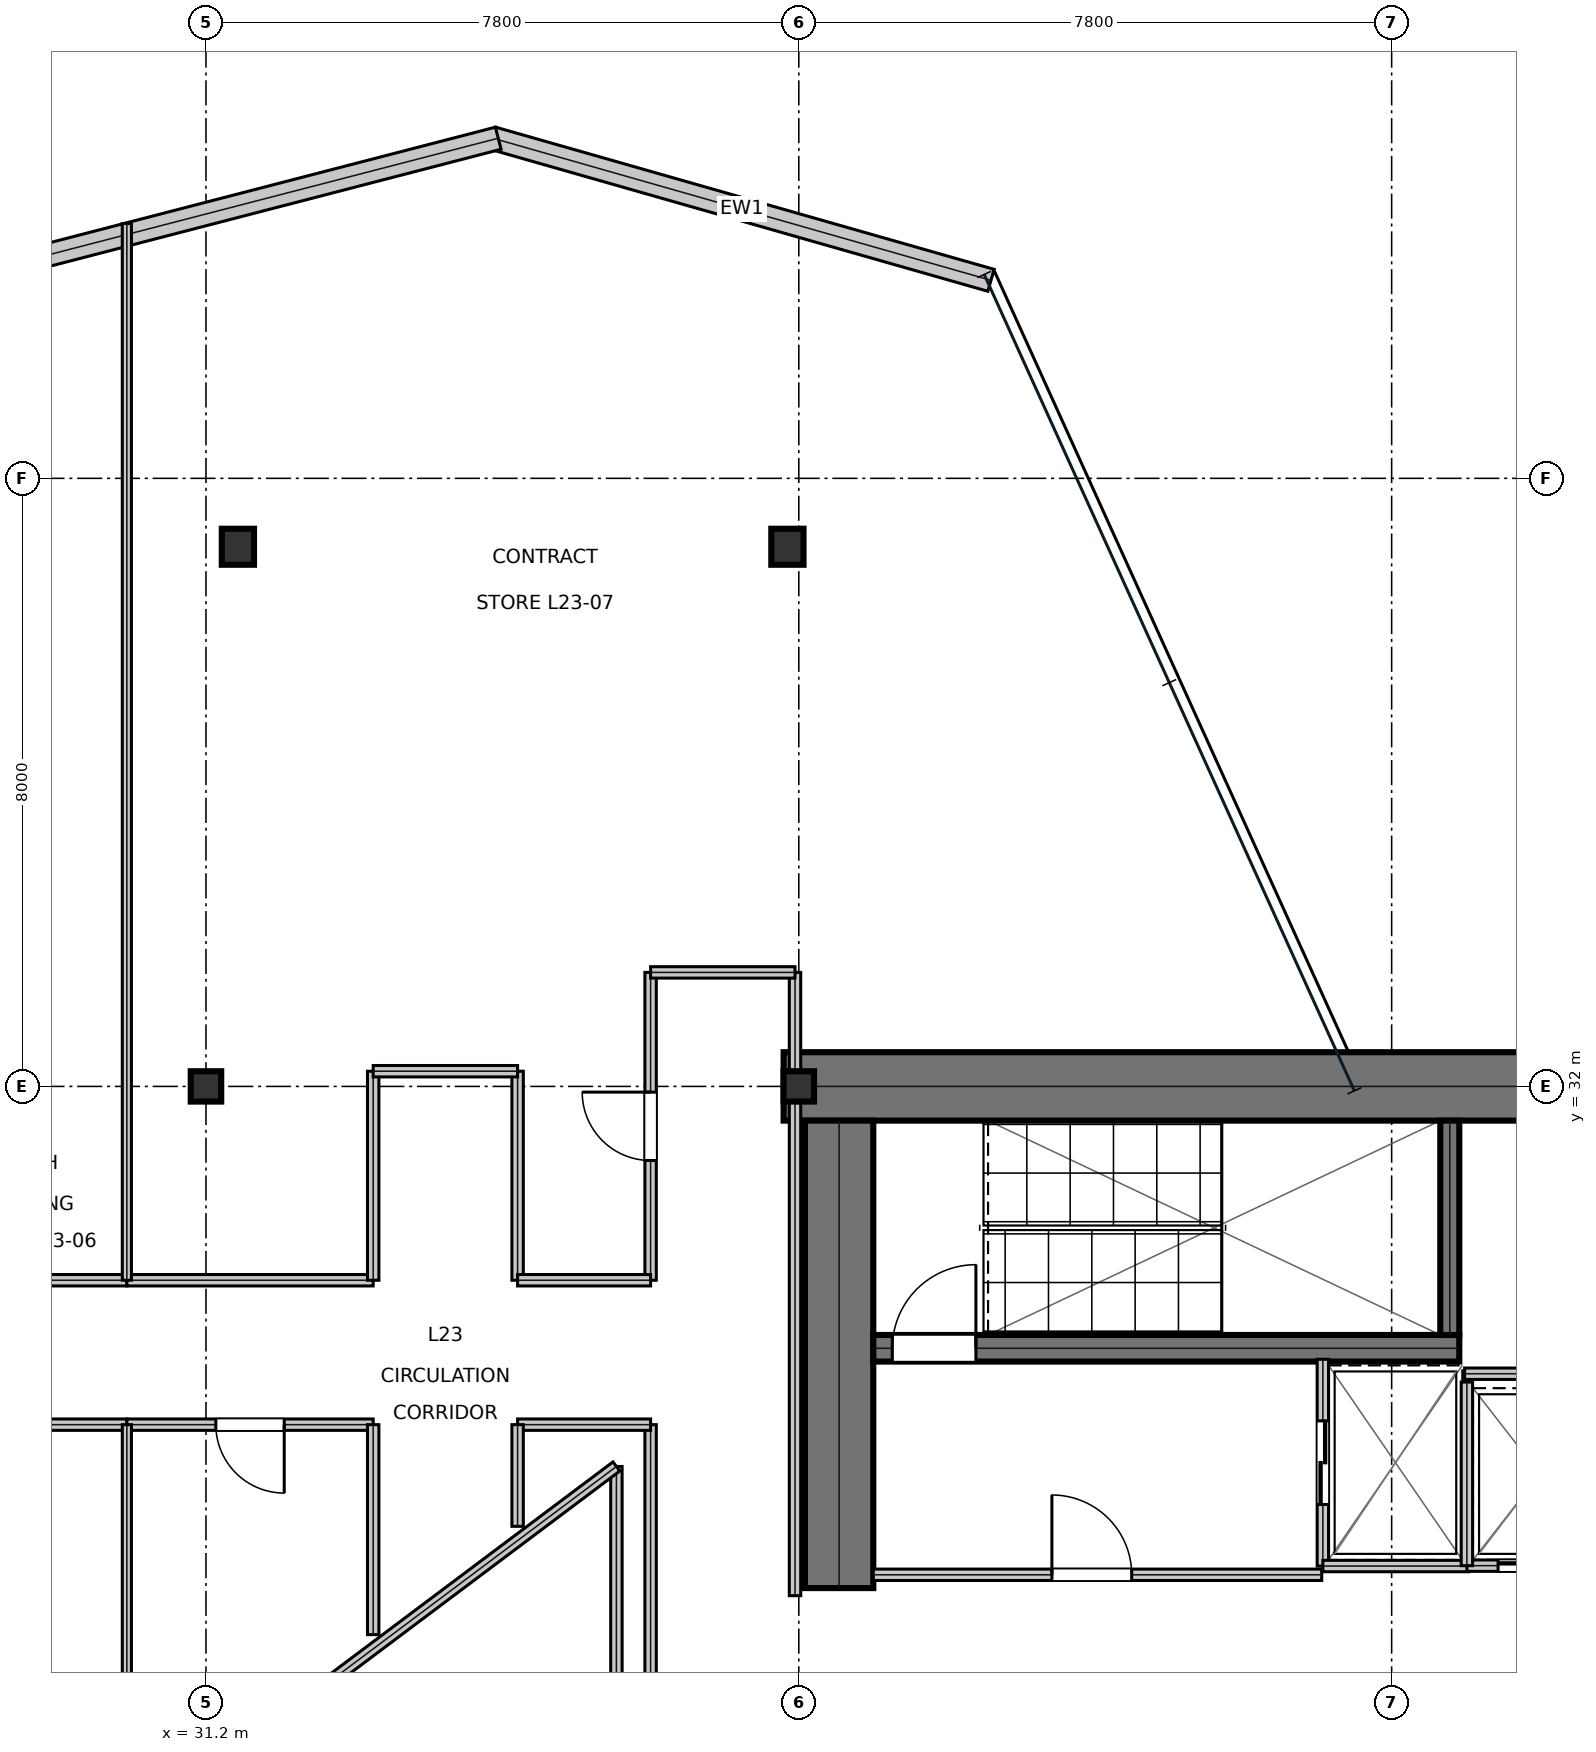
"""IFC4 building model, lengths in metres.
Left out: names, types, materials, properties, quantities, classifications, styles, units other than length and angle.
Written with IfcOpenShell. Run it as: python <this file> out.ifc"""

import sys

from ifc_helpers import new_model, si_unit, direction, frame, frame_2d, origin, origin_2d, place, context, subcontext, project, spatial, rectangle, i_section, extrude, element, fill, save


model = new_model("IFC4")
c1 = context("Model", 3, precision=1e-05, world=origin(), true_north=direction((0.0, 1.0)))
c2 = subcontext(c1, "Body", "Model", "MODEL_VIEW")
j1 = project(units=[si_unit("LENGTHUNIT", "METRE"), si_unit("PLANEANGLEUNIT", "RADIAN")], contexts=[c1])
p1 = place(None, origin())
s1 = spatial("IfcSite", under=j1, at=p1, CompositionType="ELEMENT")
p2 = place(p1, origin())
s2 = spatial("IfcBuilding", under=s1, at=p2, CompositionType="ELEMENT")
p3 = place(p2, frame((0.0, 0.0, 102.6)))
s3 = spatial("IfcBuildingStorey", under=s2, at=p3, CompositionType="ELEMENT", Elevation=102.6)
p4 = place(p3, frame((38.8, 32.0, 0.0), z_axis=(0.0, 0.0, 1.0), x_axis=(1.0, 0.0, 0.0)))
e1 = element("IfcWall", 1, at=p4, inside=s3, PredefinedType="SHEAR", context=c2, shape_type="SweptSolid", body=[
    extrude(rectangle(XDim=16.0, YDim=0.9, at=frame_2d((8.0, 0.0))), origin(), (0.0, 0.0, 1.0), 3.73),
])
p5 = place(p3, frame((39.53, 25.4, 0.0), z_axis=(0.0, 0.0, 1.0), x_axis=(0.0, 1.0, 0.0)))
e2 = element("IfcWall", 2, at=p5, inside=s3, PredefinedType="SHEAR", context=c2, shape_type="SweptSolid", body=[
    extrude(rectangle(XDim=6.15, YDim=0.9, at=frame_2d((3.075, 0.0))), origin(), (0.0, 0.0, 1.0), 3.73),
])
p6 = place(p3, frame((39.98, 28.555, 0.0), z_axis=(0.0, 0.0, 1.0), x_axis=(1.0, 0.0, 0.0)))
e3 = element("IfcWall", 3, at=p6, inside=s3, PredefinedType="SHEAR", context=c2, shape_type="SweptSolid", body=[
    extrude(rectangle(XDim=7.71, YDim=0.35, at=frame_2d((3.855, 0.0))), origin(), (0.0, 0.0, 1.0), 3.73),
])
p7 = place(p6, frame((0.25, 0.0, 0.0)))
e4 = element("IfcOpeningElement", 4, at=p7, cuts=e3, PredefinedType="OPENING", context=c2, shape_type="SweptSolid", body=[
    extrude(rectangle(XDim=1.1, YDim=2.15, at=frame_2d((0.55, 1.075))), frame((0.0, 0.185, 0.0), z_axis=(0.0, -1.0, 0.0), x_axis=(1.0, 0.0, 0.0)), (0.0, 0.0, 1.0), 0.37),
])
p8 = place(p3, frame((47.565, 28.73, 0.0), z_axis=(0.0, 0.0, 1.0), x_axis=(0.0, 1.0, 0.0)))
e5 = element("IfcWall", 5, at=p8, inside=s3, PredefinedType="SHEAR", context=c2, shape_type="SweptSolid", body=[
    extrude(rectangle(XDim=2.82, YDim=0.25, at=frame_2d((1.41, 0.0))), origin(), (0.0, 0.0, 1.0), 3.73),
])
for number, where, z_axis, x_axis in (
    (6, (31.2, 32.0, 0.0), (0.0, 0.0, 1.0), (1.0, 0.0, 0.0)),
    (7, (39.0, 32.0, 0.0), (0.0, 0.0, 1.0), (1.0, 0.0, 0.0)),
):
    element("IfcColumn", number, at=place(p3, frame(where, z_axis=z_axis, x_axis=x_axis)), inside=s3, PredefinedType="COLUMN", context=c2, shape_type="SweptSolid", body=[
        extrude(i_section(OverallWidth=0.401, OverallDepth=0.399, WebThickness=0.025, FlangeThickness=0.04, at=origin_2d()), origin(), (0.0, 0.0, 1.0), 4.044),
    ])
p9 = place(p3, frame((31.62, 39.1, 0.016), z_axis=(0.010447648562, -0.022413850693, 0.999694186207), x_axis=(0.906371306068, 0.422482018004, 0.0)))
e8 = element("IfcColumn", 8, at=p9, inside=s3, PredefinedType="COLUMN", context=c2, shape_type="SweptSolid", body=[
    extrude(i_section(OverallWidth=0.424, OverallDepth=0.474, WebThickness=0.048, FlangeThickness=0.077, at=origin_2d()), origin(), (0.0, 0.0, 1.0), 4.019),
])
p10 = place(p3, frame((38.85, 39.1, 0.016), z_axis=(-0.003766191696, -0.022414915097, 0.999741660321), x_axis=(0.986176372522, -0.165699011101, 0.0)))
e9 = element("IfcColumn", 9, at=p10, inside=s3, PredefinedType="COLUMN", context=c2, shape_type="SweptSolid", body=[
    extrude(i_section(OverallWidth=0.424, OverallDepth=0.474, WebThickness=0.048, FlangeThickness=0.077, at=origin_2d()), origin(), (0.0, 0.0, 1.0), 4.019),
])
p11 = place(p3, frame((41.528, 42.605, 0.0), z_axis=(0.0, 0.0, 1.0), x_axis=(-0.961657606646, 0.274252889831, 0.0)))
e10 = element("IfcWall", 10, at=p11, inside=s3, PredefinedType="STANDARD", context=c2, shape_type="SweptSolid", body=[
    extrude(rectangle(XDim=6.818, YDim=0.3, at=frame_2d((3.409, 0.0))), origin(), (0.0, 0.0, 1.0), 3.73),
])
p12 = place(p3, frame((35.045, 44.475, 0.0), z_axis=(0.0, 0.0, 1.0), x_axis=(-0.967987493138, -0.250998432521, 0.0)))
e11 = element("IfcWall", 11, at=p12, inside=s3, PredefinedType="STANDARD", context=c2, shape_type="SweptSolid", body=[
    extrude(rectangle(XDim=6.774, YDim=0.3, at=frame_2d((3.387, 0.0))), origin(), (0.0, 0.0, 1.0), 3.73),
])
p13 = place(p3, frame((39.98, 25.575, 0.0), z_axis=(0.0, 0.0, 1.0), x_axis=(1.0, 0.0, 0.0)))
e12 = element("IfcWall", 12, at=p13, inside=s3, PredefinedType="PARTITIONING", context=c2, shape_type="SweptSolid", body=[
    extrude(rectangle(XDim=5.9, YDim=0.15, at=frame_2d((2.95, 0.0))), origin(), (0.0, 0.0, 1.0), 3.73),
])
p14 = place(p13, frame((2.35, 0.0, 0.0)))
e13 = element("IfcOpeningElement", 13, at=p14, cuts=e12, PredefinedType="OPENING", context=c2, shape_type="SweptSolid", body=[
    extrude(rectangle(XDim=1.05, YDim=2.15, at=frame_2d((0.525, 1.075))), frame((0.0, 0.085, 0.0), z_axis=(0.0, -1.0, 0.0), x_axis=(1.0, 0.0, 0.0)), (0.0, 0.0, 1.0), 0.17),
])
p15 = place(p3, frame((45.895, 25.69, 0.0), z_axis=(0.0, 0.0, 1.0), x_axis=(0.0, 1.0, 0.0)))
e14 = element("IfcWall", 14, at=p15, inside=s3, PredefinedType="PARTITIONING", context=c2, shape_type="SweptSolid", body=[
    extrude(rectangle(XDim=2.72, YDim=0.15, at=frame_2d((1.36, 0.0))), origin(), (0.0, 0.0, 1.0), 3.73),
])
p16 = place(p15, frame((0.81, 0.0, 0.0)))
e15 = element("IfcOpeningElement", 15, at=p16, cuts=e14, PredefinedType="OPENING", context=c2, shape_type="SweptSolid", body=[
    extrude(rectangle(XDim=1.1, YDim=2.15, at=frame_2d((0.55, 1.075))), frame((0.0, 0.085, 0.0), z_axis=(0.0, -1.0, 0.0), x_axis=(1.0, 0.0, 0.0)), (0.0, 0.0, 1.0), 0.17),
])
p17 = place(p3, frame((45.895, 25.69, 0.0), z_axis=(0.0, 0.0, 1.0), x_axis=(1.0, 0.0, 0.0)))
e16 = element("IfcWall", 16, at=p17, inside=s3, PredefinedType="PARTITIONING", context=c2, shape_type="SweptSolid", body=[
    extrude(rectangle(XDim=1.915, YDim=0.15, at=frame_2d((0.958, 0.0))), origin(), (0.0, 0.0, 1.0), 3.73),
])
p18 = place(p3, frame((47.79, 25.695, 0.0), z_axis=(0.0, 0.0, 1.0), x_axis=(1.0, 0.0, 0.0)))
e17 = element("IfcWall", 17, at=p18, inside=s3, PredefinedType="PARTITIONING", context=c2, shape_type="SweptSolid", body=[
    extrude(rectangle(XDim=1.92, YDim=0.15, at=frame_2d((0.96, 0.0))), origin(), (0.0, 0.0, 1.0), 3.73),
])
p19 = place(p18, frame((0.41, 0.0, 0.0)))
e18 = element("IfcOpeningElement", 18, at=p19, cuts=e17, PredefinedType="OPENING", context=c2, shape_type="SweptSolid", body=[
    extrude(rectangle(XDim=1.1, YDim=2.15, at=frame_2d((0.55, 1.075))), frame((0.0, 0.085, 0.0), z_axis=(0.0, -1.0, 0.0), x_axis=(1.0, 0.0, 0.0)), (0.0, 0.0, 1.0), 0.17),
])
p20 = place(p3, frame((47.79, 25.695, 0.0), z_axis=(0.0, 0.0, 1.0), x_axis=(0.0, 1.0, 0.0)))
e19 = element("IfcWall", 19, at=p20, inside=s3, PredefinedType="PARTITIONING", context=c2, shape_type="SweptSolid", body=[
    extrude(rectangle(XDim=2.415, YDim=0.15, at=frame_2d((1.208, 0.0))), origin(), (0.0, 0.0, 1.0), 3.73),
])
p21 = place(p3, frame((47.76, 28.22, 0.0), z_axis=(0.0, 0.0, 1.0), x_axis=(1.0, 0.0, 0.0)))
e20 = element("IfcWall", 20, at=p21, inside=s3, PredefinedType="PARTITIONING", context=c2, shape_type="SweptSolid", body=[
    extrude(rectangle(XDim=1.96, YDim=0.15, at=frame_2d((0.98, 0.0))), origin(), (0.0, 0.0, 1.0), 3.73),
])
p22 = place(p3, frame((37.05, 14.5, 0.0), z_axis=(0.0, 0.0, 1.0), x_axis=(0.0, 1.0, 0.0)))
e21 = element("IfcWall", 21, at=p22, inside=s3, PredefinedType="PARTITIONING", context=c2, shape_type="SweptSolid", body=[
    extrude(rectangle(XDim=13.05, YDim=0.15, at=frame_2d((6.525, 0.0))), origin(), (0.0, 0.0, 1.0), 3.101),
])
p23 = place(p22, frame((4.635, 0.0, 0.0)))
e22 = element("IfcOpeningElement", 22, at=p23, cuts=e21, PredefinedType="OPENING", context=c2, shape_type="SweptSolid", body=[
    extrude(rectangle(XDim=0.9, YDim=2.15, at=frame_2d((0.45, 1.075))), frame((0.0, 0.085, 0.0), z_axis=(0.0, -1.0, 0.0), x_axis=(1.0, 0.0, 0.0)), (0.0, 0.0, 1.0), 0.17),
])
p24 = place(p3, frame((21.4, 27.55, 0.0), z_axis=(0.0, 0.0, 1.0), x_axis=(1.0, 0.0, 0.0)))
e23 = element("IfcWall", 23, at=p24, inside=s3, PredefinedType="PARTITIONING", context=c2, shape_type="SweptSolid", body=[
    extrude(rectangle(XDim=8.759, YDim=0.15, at=frame_2d((4.379, 0.0))), origin(), (0.0, 0.0, 1.0), 3.311),
])
p25 = place(p24, frame((3.929, 0.0, 0.0)))
e24 = element("IfcOpeningElement", 24, at=p25, cuts=e23, PredefinedType="OPENING", context=c2, shape_type="SweptSolid", body=[
    extrude(rectangle(XDim=0.9, YDim=2.15, at=frame_2d((0.45, 1.075))), frame((0.0, 0.085, 0.0), z_axis=(0.0, -1.0, 0.0), x_axis=(1.0, 0.0, 0.0)), (0.0, 0.0, 1.0), 0.17),
])
p26 = place(p3, frame((30.159, 27.55, 0.0), z_axis=(0.0, 0.0, 1.0), x_axis=(1.0, 0.0, 0.0)))
e25 = element("IfcWall", 25, at=p26, inside=s3, PredefinedType="PARTITIONING", context=c2, shape_type="SweptSolid", body=[
    extrude(rectangle(XDim=3.241, YDim=0.15, at=frame_2d((1.621, 0.0))), origin(), (0.0, 0.0, 1.0), 3.101),
])
p27 = place(p26, frame((1.17, 0.0, 0.0)))
e26 = element("IfcOpeningElement", 26, at=p27, cuts=e25, PredefinedType="OPENING", context=c2, shape_type="SweptSolid", body=[
    extrude(rectangle(XDim=0.9, YDim=2.15, at=frame_2d((0.45, 1.075))), frame((0.0, 0.085, 0.0), z_axis=(0.0, -1.0, 0.0), x_axis=(1.0, 0.0, 0.0)), (0.0, 0.0, 1.0), 0.17),
])
p28 = place(p3, frame((19.5, 29.45, 0.0), z_axis=(0.0, 0.0, 1.0), x_axis=(1.0, 0.0, 0.0)))
e27 = element("IfcWall", 27, at=p28, inside=s3, PredefinedType="PARTITIONING", context=c2, shape_type="SweptSolid", body=[
    extrude(rectangle(XDim=10.659, YDim=0.15, at=frame_2d((5.33, 0.0))), origin(), (0.0, 0.0, 1.0), 3.258),
])
p29 = place(p28, frame((7.399, 0.0, 0.0)))
e28 = element("IfcOpeningElement", 28, at=p29, cuts=e27, PredefinedType="OPENING", context=c2, shape_type="SweptSolid", body=[
    extrude(rectangle(XDim=0.9, YDim=2.15, at=frame_2d((0.45, 1.075))), frame((0.0, 0.085, 0.0), z_axis=(0.0, -1.0, 0.0), x_axis=(1.0, 0.0, 0.0)), (0.0, 0.0, 1.0), 0.17),
])
p30 = place(p3, frame((37.05, 29.45, 0.0), z_axis=(0.0, 0.0, 1.0), x_axis=(0.0, 1.0, 0.0)))
e29 = element("IfcWall", 29, at=p30, inside=s3, PredefinedType="PARTITIONING", context=c2, shape_type="SweptSolid", body=[
    extrude(rectangle(XDim=4.05, YDim=0.15, at=frame_2d((2.025, 0.0))), origin(), (0.0, 0.0, 1.0), 3.101),
])
p31 = place(p30, frame((1.575, 0.0, 0.0)))
e30 = element("IfcOpeningElement", 30, at=p31, cuts=e29, PredefinedType="OPENING", context=c2, shape_type="SweptSolid", body=[
    extrude(rectangle(XDim=0.9, YDim=2.15, at=frame_2d((0.45, 1.075))), frame((0.0, 0.085, 0.0), z_axis=(0.0, -1.0, 0.0), x_axis=(1.0, 0.0, 0.0)), (0.0, 0.0, 1.0), 0.17),
])
p32 = place(p3, frame((35.3, 27.55, 0.0), z_axis=(0.0, 0.0, 1.0), x_axis=(1.0, 0.0, 0.0)))
e31 = element("IfcWall", 31, at=p32, inside=s3, PredefinedType="PARTITIONING", context=c2, shape_type="SweptSolid", body=[
    extrude(rectangle(XDim=1.75, YDim=0.15, at=frame_2d((0.875, 0.0))), origin(), (0.0, 0.0, 1.0), 3.311),
])
p33 = place(p3, frame((35.3, 26.212, 0.0), z_axis=(0.0, 0.0, 1.0), x_axis=(0.0, 1.0, 0.0)))
e32 = element("IfcWall", 32, at=p33, inside=s3, PredefinedType="PARTITIONING", context=c2, shape_type="SweptSolid", body=[
    extrude(rectangle(XDim=1.338, YDim=0.15, at=frame_2d((0.669, 0.0))), origin(), (0.0, 0.0, 1.0), 3.73),
])
p34 = place(p3, frame((33.4, 24.788, 0.0), z_axis=(0.0, 0.0, 1.0), x_axis=(0.0, 1.0, 0.0)))
e33 = element("IfcWall", 33, at=p34, inside=s3, PredefinedType="PARTITIONING", context=c2, shape_type="SweptSolid", body=[
    extrude(rectangle(XDim=2.762, YDim=0.15, at=frame_2d((1.381, 0.0))), origin(), (0.0, 0.0, 1.0), 3.73),
])
p35 = place(p3, frame((38.95, 25.3, 0.0), z_axis=(0.0, 0.0, 1.0), x_axis=(0.0, 1.0, 0.0)))
e34 = element("IfcWall", 34, at=p35, inside=s3, PredefinedType="PARTITIONING", context=c2, shape_type="SweptSolid", body=[
    extrude(rectangle(XDim=8.2, YDim=0.15, at=frame_2d((4.1, 0.0))), origin(), (0.0, 0.0, 1.0), 3.101),
])
p36 = place(p3, frame((30.159, 29.45, 0.0), z_axis=(0.0, 0.0, 1.0), x_axis=(1.0, 0.0, 0.0)))
e35 = element("IfcWall", 35, at=p36, inside=s3, PredefinedType="PARTITIONING", context=c2, shape_type="SweptSolid", body=[
    extrude(rectangle(XDim=3.241, YDim=0.15, at=frame_2d((1.621, 0.0))), origin(), (0.0, 0.0, 1.0), 3.101),
])
for number, where, z_axis, x_axis in (
    (36, (33.4, 29.45, 0.0), (0.0, 0.0, 1.0), (0.0, 1.0, 0.0)),
    (37, (35.3, 29.45, 0.0), (0.0, 0.0, 1.0), (0.0, 1.0, 0.0)),
):
    element("IfcWall", number, at=place(p3, frame(where, z_axis=z_axis, x_axis=x_axis)), inside=s3, PredefinedType="PARTITIONING", context=c2, shape_type="SweptSolid", body=[
        extrude(rectangle(XDim=2.75, YDim=0.15, at=frame_2d((1.375, 0.0))), origin(), (0.0, 0.0, 1.0), 3.101),
    ])
p37 = place(p3, frame((37.05, 33.5, 0.0), z_axis=(0.0, 0.0, 1.0), x_axis=(1.0, 0.0, 0.0)))
e38 = element("IfcWall", 38, at=p37, inside=s3, PredefinedType="PARTITIONING", context=c2, shape_type="SweptSolid", body=[
    extrude(rectangle(XDim=1.9, YDim=0.15, at=frame_2d((0.95, 0.0))), origin(), (0.0, 0.0, 1.0), 3.101),
])
p38 = place(p3, frame((33.4, 32.2, 0.0), z_axis=(0.0, 0.0, 1.0), x_axis=(1.0, 0.0, 0.0)))
e39 = element("IfcWall", 39, at=p38, inside=s3, PredefinedType="PARTITIONING", context=c2, shape_type="SweptSolid", body=[
    extrude(rectangle(XDim=1.9, YDim=0.15, at=frame_2d((0.95, 0.0))), origin(), (0.0, 0.0, 1.0), 3.101),
])
p39 = place(p3, frame((35.3, 29.45, 0.0), z_axis=(0.0, 0.0, 1.0), x_axis=(1.0, 0.0, 0.0)))
e40 = element("IfcWall", 40, at=p39, inside=s3, PredefinedType="PARTITIONING", context=c2, shape_type="SweptSolid", body=[
    extrude(rectangle(XDim=1.75, YDim=0.15, at=frame_2d((0.875, 0.0))), origin(), (0.0, 0.0, 1.0), 3.73),
])
p40 = place(p3, frame((30.159, 20.45, 0.0), z_axis=(0.0, 0.0, 1.0), x_axis=(0.0, 1.0, 0.0)))
e41 = element("IfcWall", 41, at=p40, inside=s3, PredefinedType="PARTITIONING", context=c2, shape_type="SweptSolid", body=[
    extrude(rectangle(XDim=7.1, YDim=0.12, at=frame_2d((3.55, 0.0))), origin(), (0.0, 0.0, 1.0), 3.101),
])
p41 = place(p3, frame((30.159, 29.45, 0.0), z_axis=(0.0, 0.0, 1.0), x_axis=(0.0, 1.0, 0.0)))
e42 = element("IfcWall", 42, at=p41, inside=s3, PredefinedType="PARTITIONING", context=c2, shape_type="SweptSolid", body=[
    extrude(rectangle(XDim=13.902, YDim=0.12, at=frame_2d((6.951, 0.0))), origin(), (0.0, 0.0, 1.0), 3.258),
])
p42 = place(p3, frame((36.6, 21.0, 0.0), z_axis=(0.0, 0.0, 1.0), x_axis=(0.0, 1.0, 0.0)))
e43 = element("IfcWall", 43, at=p42, inside=s3, PredefinedType="MOVABLE", context=c2, shape_type="SweptSolid", body=[
    extrude(rectangle(XDim=6.0, YDim=0.15, at=frame_2d((3.0, 0.0))), origin(), (0.0, 0.0, 1.0), 3.73),
])
p43 = place(p3, frame((36.6, 27.0, 0.0), z_axis=(0.0, 0.0, 1.0), x_axis=(-0.8, -0.6, 0.0)))
e44 = element("IfcWall", 44, at=p43, inside=s3, PredefinedType="MOVABLE", context=c2, shape_type="SweptSolid", body=[
    extrude(rectangle(XDim=5.0, YDim=0.15, at=frame_2d((2.5, 0.0))), origin(), (0.0, 0.0, 1.0), 3.73),
])
p44 = place(p14, origin())
e45 = element("IfcDoor", 45, at=p44, inside=s3, OperationType="SINGLE_SWING_LEFT", PredefinedType="DOOR", context=c2, shape_type="SweptSolid", body=[
    extrude(rectangle(XDim=1.05, YDim=2.15, at=frame_2d((0.525, 1.075))), frame((0.0, 0.025, 0.0), z_axis=(0.0, -1.0, 0.0), x_axis=(1.0, 0.0, 0.0)), (0.0, 0.0, 1.0), 0.05),
])
fill(e13, e45)
p45 = place(p16, frame((1.1, 0.0, 0.0), z_axis=(0.0, 0.0, 1.0), x_axis=(-1.0, 0.0, 0.0)))
e46 = element("IfcDoor", 46, at=p45, inside=s3, OperationType="DOUBLE_DOOR_SLIDING", PredefinedType="DOOR", context=c2, shape_type="SweptSolid", body=[
    extrude(rectangle(XDim=1.1, YDim=2.15, at=frame_2d((0.55, 1.075))), frame((0.0, 0.025, 0.0), z_axis=(0.0, -1.0, 0.0), x_axis=(1.0, 0.0, 0.0)), (0.0, 0.0, 1.0), 0.05),
])
fill(e15, e46)
p46 = place(p19, frame((1.1, 0.0, 0.0), z_axis=(0.0, 0.0, 1.0), x_axis=(-1.0, 0.0, 0.0)))
e47 = element("IfcDoor", 47, at=p46, inside=s3, OperationType="DOUBLE_DOOR_SLIDING", PredefinedType="DOOR", context=c2, shape_type="SweptSolid", body=[
    extrude(rectangle(XDim=1.1, YDim=2.15, at=frame_2d((0.55, 1.075))), frame((0.0, 0.025, 0.0), z_axis=(0.0, -1.0, 0.0), x_axis=(1.0, 0.0, 0.0)), (0.0, 0.0, 1.0), 0.05),
])
fill(e18, e47)
p47 = place(p27, frame((0.9, 0.0, 0.0), z_axis=(0.0, 0.0, 1.0), x_axis=(-1.0, 0.0, 0.0)))
e48 = element("IfcDoor", 48, at=p47, inside=s3, OperationType="SINGLE_SWING_LEFT", PredefinedType="DOOR", context=c2, shape_type="SweptSolid", body=[
    extrude(rectangle(XDim=0.9, YDim=2.15, at=frame_2d((0.45, 1.075))), frame((0.0, 0.025, 0.0), z_axis=(0.0, -1.0, 0.0), x_axis=(1.0, 0.0, 0.0)), (0.0, 0.0, 1.0), 0.05),
])
fill(e26, e48)
p48 = place(p31, origin())
e49 = element("IfcDoor", 49, at=p48, inside=s3, OperationType="SINGLE_SWING_RIGHT", PredefinedType="DOOR", context=c2, shape_type="SweptSolid", body=[
    extrude(rectangle(XDim=0.9, YDim=2.15, at=frame_2d((0.45, 1.075))), frame((0.0, 0.025, 0.0), z_axis=(0.0, -1.0, 0.0), x_axis=(1.0, 0.0, 0.0)), (0.0, 0.0, 1.0), 0.05),
])
fill(e30, e49)
p49 = place(p7, origin())
e50 = element("IfcDoor", 50, at=p49, inside=s3, OperationType="SINGLE_SWING_RIGHT", PredefinedType="DOOR", context=c2, shape_type="SweptSolid", body=[
    extrude(rectangle(XDim=1.1, YDim=2.15, at=frame_2d((0.55, 1.075))), frame((0.0, 0.025, 0.0), z_axis=(0.0, -1.0, 0.0), x_axis=(1.0, 0.0, 0.0)), (0.0, 0.0, 1.0), 0.05),
])
fill(e4, e50)
save(model, sys.argv[1])
